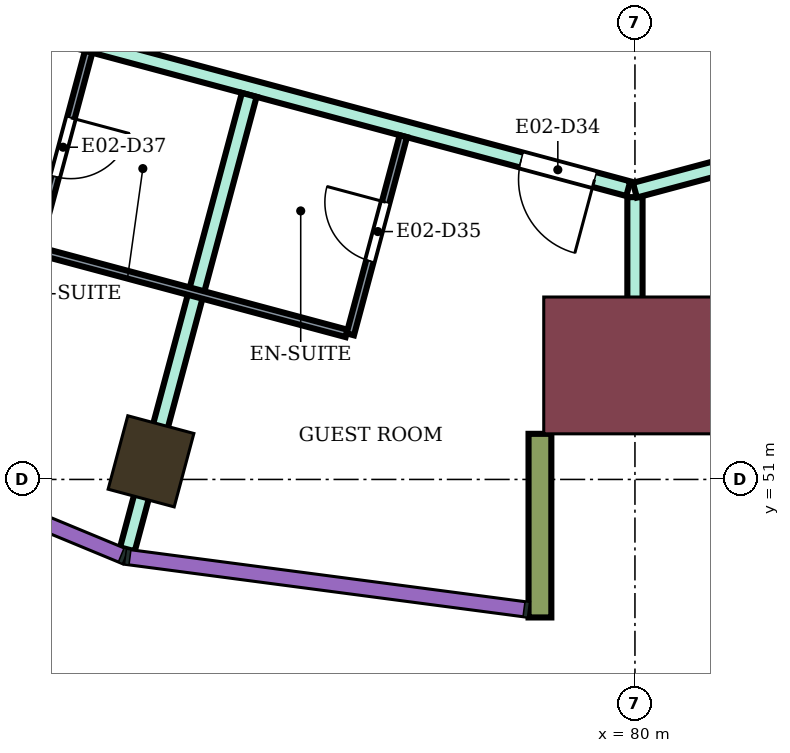
"""IFC4 building model, lengths in metres.
Left out: names, types, materials, properties, quantities, classifications, styles, units other than length and angle.
Written with IfcOpenShell. Run it as: python <this file> out.ifc"""

import sys

from ifc_helpers import new_model, si_unit, direction, frame, frame_2d, origin, origin_2d, place, context, subcontext, project, spatial, rectangle, extrude, element, fill, save


model = new_model("IFC4")
c1 = context("Model", 3, precision=1e-05, world=origin(), true_north=direction((0.0, 1.0)))
c2 = subcontext(c1, "Body", "Model", "MODEL_VIEW")
j1 = project(units=[si_unit("LENGTHUNIT", "METRE"), si_unit("PLANEANGLEUNIT", "RADIAN")], contexts=[c1])
p1 = place(None, origin())
s1 = spatial("IfcSite", under=j1, at=p1, CompositionType="ELEMENT")
p2 = place(p1, origin())
s2 = spatial("IfcBuilding", under=s1, at=p2, CompositionType="ELEMENT")
p3 = place(p2, frame((0.0, 0.0, 134.1)))
s3 = spatial("IfcBuildingStorey", under=s2, at=p3, CompositionType="ELEMENT", Elevation=134.1)
p4 = place(p3, frame((73.633, 51.238, 0.0), z_axis=(0.0, 0.0, 1.0), x_axis=(-0.258819045103, -0.965925826289, 0.0)))
e1 = element("IfcColumn", 1, at=p4, inside=s3, PredefinedType="COLUMN", context=c2, shape_type="SweptSolid", body=[
    extrude(rectangle(XDim=1.0, YDim=0.9, at=origin_2d()), origin(), (0.0, 0.0, 1.0), 3.9),
])
p5 = place(p3, frame((80.0, 52.5, 0.0), z_axis=(0.0, 0.0, 1.0), x_axis=(0.0, -1.0, 0.0)))
e2 = element("IfcColumn", 2, at=p5, inside=s3, PredefinedType="COLUMN", context=c2, shape_type="SweptSolid", body=[
    extrude(rectangle(XDim=1.8, YDim=2.4, at=origin_2d()), origin(), (0.0, 0.0, 1.0), 3.9),
])
p6 = place(p3, frame((78.75, 51.6, 0.0), z_axis=(0.0, 0.0, 1.0), x_axis=(0.0, -1.0, 0.0)))
e3 = element("IfcWall", 3, at=p6, inside=s3, PredefinedType="NOTDEFINED", context=c2, shape_type="SweptSolid", body=[
    extrude(rectangle(XDim=2.416, YDim=0.3, at=frame_2d((1.208, 0.0))), origin(), (0.0, 0.0, 1.0), 3.9),
])
p7 = place(p3, frame((69.652, 57.578, 0.0), z_axis=(0.0, 0.0, 1.0), x_axis=(0.965851674805, -0.259095623807, 0.0)))
e4 = element("IfcWall", 4, at=p7, inside=s3, PredefinedType="PARTITIONING", context=c2, shape_type="SweptSolid", body=[
    extrude(rectangle(XDim=10.623, YDim=0.2, at=frame_2d((5.312, 0.0))), origin(), (0.0, 0.0, 1.0), 3.45),
])
p8 = place(p7, frame((9.163, 0.0, 0.0)))
e5 = element("IfcOpeningElement", 5, at=p8, cuts=e4, PredefinedType="OPENING", context=c2, shape_type="SweptSolid", body=[
    extrude(rectangle(XDim=1.0, YDim=2.1, at=frame_2d((0.5, 1.05))), frame((0.0, 0.11, 0.0), z_axis=(0.0, -1.0, 0.0), x_axis=(1.0, 0.0, 0.0)), (0.0, 0.0, 1.0), 0.22),
])
p9 = place(p3, frame((73.323, 50.081, 0.0), z_axis=(0.0, 0.0, 1.0), x_axis=(0.258983179771, 0.96588183159, 0.0)))
e6 = element("IfcWall", 6, at=p9, inside=s3, PredefinedType="PARTITIONING", context=c2, shape_type="SweptSolid", body=[
    extrude(rectangle(XDim=6.19, YDim=0.2, at=frame_2d((3.095, 0.0))), origin(), (0.0, 0.0, 1.0), 3.45),
])
p10 = place(p3, frame((80.0, 51.8, 0.0), z_axis=(0.0, 0.0, 1.0), x_axis=(0.0, 1.0, 0.0)))
e7 = element("IfcWall", 7, at=p10, inside=s3, PredefinedType="PARTITIONING", context=c2, shape_type="SweptSolid", body=[
    extrude(rectangle(XDim=2.914, YDim=0.2, at=frame_2d((1.457, 0.0))), origin(), (0.0, 0.0, 1.0), 3.45),
])
p11 = place(p3, frame((80.0, 54.805, 0.0), z_axis=(0.0, 0.0, 1.0), x_axis=(0.965967909695, 0.258661936588, 0.0)))
e8 = element("IfcWall", 8, at=p11, inside=s3, PredefinedType="PARTITIONING", context=c2, shape_type="SweptSolid", body=[
    extrude(rectangle(XDim=10.643, YDim=0.2, at=frame_2d((5.322, 0.0))), origin(), (0.0, 0.0, 1.0), 3.45),
])
p12 = place(p11, frame((8.925, 0.0, 0.0)))
e9 = element("IfcOpeningElement", 9, at=p12, cuts=e8, PredefinedType="OPENING", context=c2, shape_type="SweptSolid", body=[
    extrude(rectangle(XDim=1.0, YDim=2.1, at=frame_2d((0.5, 1.05))), frame((0.0, 0.11, 0.0), z_axis=(0.0, -1.0, 0.0), x_axis=(1.0, 0.0, 0.0)), (0.0, 0.0, 1.0), 0.22),
])
p13 = place(p11, frame((2.123, 0.0, 0.0)))
e10 = element("IfcOpeningElement", 10, at=p13, cuts=e8, PredefinedType="OPENING", context=c2, shape_type="SweptSolid", body=[
    extrude(rectangle(XDim=1.0, YDim=2.1, at=frame_2d((0.5, 1.05))), frame((0.0, 0.11, 0.0), z_axis=(0.0, -1.0, 0.0), x_axis=(1.0, 0.0, 0.0)), (0.0, 0.0, 1.0), 0.22),
])
p14 = place(p3, frame((72.167, 54.004, 0.0), z_axis=(0.0, 0.0, 1.0), x_axis=(0.965881316313, -0.258985101497, 0.0)))
e11 = element("IfcWall", 11, at=p14, inside=s3, PredefinedType="PARTITIONING", context=c2, shape_type="SweptSolid", body=[
    extrude(rectangle(XDim=4.182, YDim=0.1, at=frame_2d((2.091, 0.0))), origin(), (0.0, 0.0, 1.0), 3.45),
])
p15 = place(p3, frame((72.114, 54.018, 0.0), z_axis=(0.0, 0.0, 1.0), x_axis=(0.258945475746, 0.965891940432, 0.0)))
e12 = element("IfcWall", 12, at=p15, inside=s3, PredefinedType="PARTITIONING", context=c2, shape_type="SweptSolid", body=[
    extrude(rectangle(XDim=2.7, YDim=0.1, at=frame_2d((1.35, 0.0))), origin(), (0.0, 0.0, 1.0), 3.45),
])
p16 = place(p15, frame((1.0, 0.0, 0.0)))
e13 = element("IfcOpeningElement", 13, at=p16, cuts=e12, PredefinedType="OPENING", context=c2, shape_type="SweptSolid", body=[
    extrude(rectangle(XDim=0.8, YDim=2.1, at=frame_2d((0.4, 1.05))), frame((0.0, 0.06, 0.0), z_axis=(0.0, -1.0, 0.0), x_axis=(1.0, 0.0, 0.0)), (0.0, 0.0, 1.0), 0.12),
])
p17 = place(p3, frame((76.255, 52.909, 0.0), z_axis=(0.0, 0.0, 1.0), x_axis=(0.25867580527, 0.965964195904, 0.0)))
e14 = element("IfcWall", 14, at=p17, inside=s3, PredefinedType="PARTITIONING", context=c2, shape_type="SweptSolid", body=[
    extrude(rectangle(XDim=2.699, YDim=0.1, at=frame_2d((1.35, 0.0))), origin(), (0.0, 0.0, 1.0), 3.45),
])
p18 = place(p17, frame((1.0, 0.0, 0.0)))
e15 = element("IfcOpeningElement", 15, at=p18, cuts=e14, PredefinedType="OPENING", context=c2, shape_type="SweptSolid", body=[
    extrude(rectangle(XDim=0.8, YDim=2.1, at=frame_2d((0.4, 1.05))), frame((0.0, 0.06, 0.0), z_axis=(0.0, -1.0, 0.0), x_axis=(1.0, 0.0, 0.0)), (0.0, 0.0, 1.0), 0.12),
])
p19 = place(p3, frame((80.106, 52.14, 0.0), z_axis=(0.0, 0.0, 1.0), x_axis=(0.965888724411, 0.25895747152, 0.0)))
e16 = element("IfcWall", 16, at=p19, inside=s3, PredefinedType="PARTITIONING", context=c2, shape_type="SweptSolid", body=[
    extrude(rectangle(XDim=5.714, YDim=0.1, at=frame_2d((2.857, 0.0))), origin(), (0.0, 0.0, 1.0), 3.45),
])
p20 = place(p19, frame((3.392, 0.0, 0.0)))
e17 = element("IfcOpeningElement", 17, at=p20, cuts=e16, PredefinedType="OPENING", context=c2, shape_type="SweptSolid", body=[
    extrude(rectangle(XDim=0.9, YDim=2.1, at=frame_2d((0.45, 1.05))), frame((0.0, 0.06, 0.0), z_axis=(0.0, -1.0, 0.0), x_axis=(1.0, 0.0, 0.0)), (0.0, 0.0, 1.0), 0.12),
])
p21 = place(p8, frame((1.0, 0.0, 0.0), z_axis=(0.0, 0.0, 1.0), x_axis=(-1.0, 0.0, 0.0)))
e18 = element("IfcDoor", 18, at=p21, inside=s3, OperationType="SINGLE_SWING_LEFT", PredefinedType="DOOR", context=c2, shape_type="SweptSolid", body=[
    extrude(rectangle(XDim=1.0, YDim=2.1, at=frame_2d((0.5, 1.05))), frame((0.0, 0.025, 0.0), z_axis=(0.0, -1.0, 0.0), x_axis=(1.0, 0.0, 0.0)), (0.0, 0.0, 1.0), 0.05),
])
fill(e5, e18)
p22 = place(p18, origin())
e19 = element("IfcDoor", 19, at=p22, inside=s3, OperationType="SINGLE_SWING_RIGHT", PredefinedType="DOOR", context=c2, shape_type="SweptSolid", body=[
    extrude(rectangle(XDim=0.8, YDim=2.1, at=frame_2d((0.4, 1.05))), frame((0.0, 0.025, 0.0), z_axis=(0.0, -1.0, 0.0), x_axis=(1.0, 0.0, 0.0)), (0.0, 0.0, 1.0), 0.05),
])
fill(e15, e19)
p23 = place(p16, frame((0.8, 0.0, 0.0), z_axis=(0.0, 0.0, 1.0), x_axis=(-1.0, 0.0, 0.0)))
e20 = element("IfcDoor", 20, at=p23, inside=s3, OperationType="SINGLE_SWING_LEFT", PredefinedType="DOOR", context=c2, shape_type="SweptSolid", body=[
    extrude(rectangle(XDim=0.8, YDim=2.1, at=frame_2d((0.4, 1.05))), frame((0.0, 0.025, 0.0), z_axis=(0.0, -1.0, 0.0), x_axis=(1.0, 0.0, 0.0)), (0.0, 0.0, 1.0), 0.05),
])
fill(e13, e20)
save(model, sys.argv[1])
